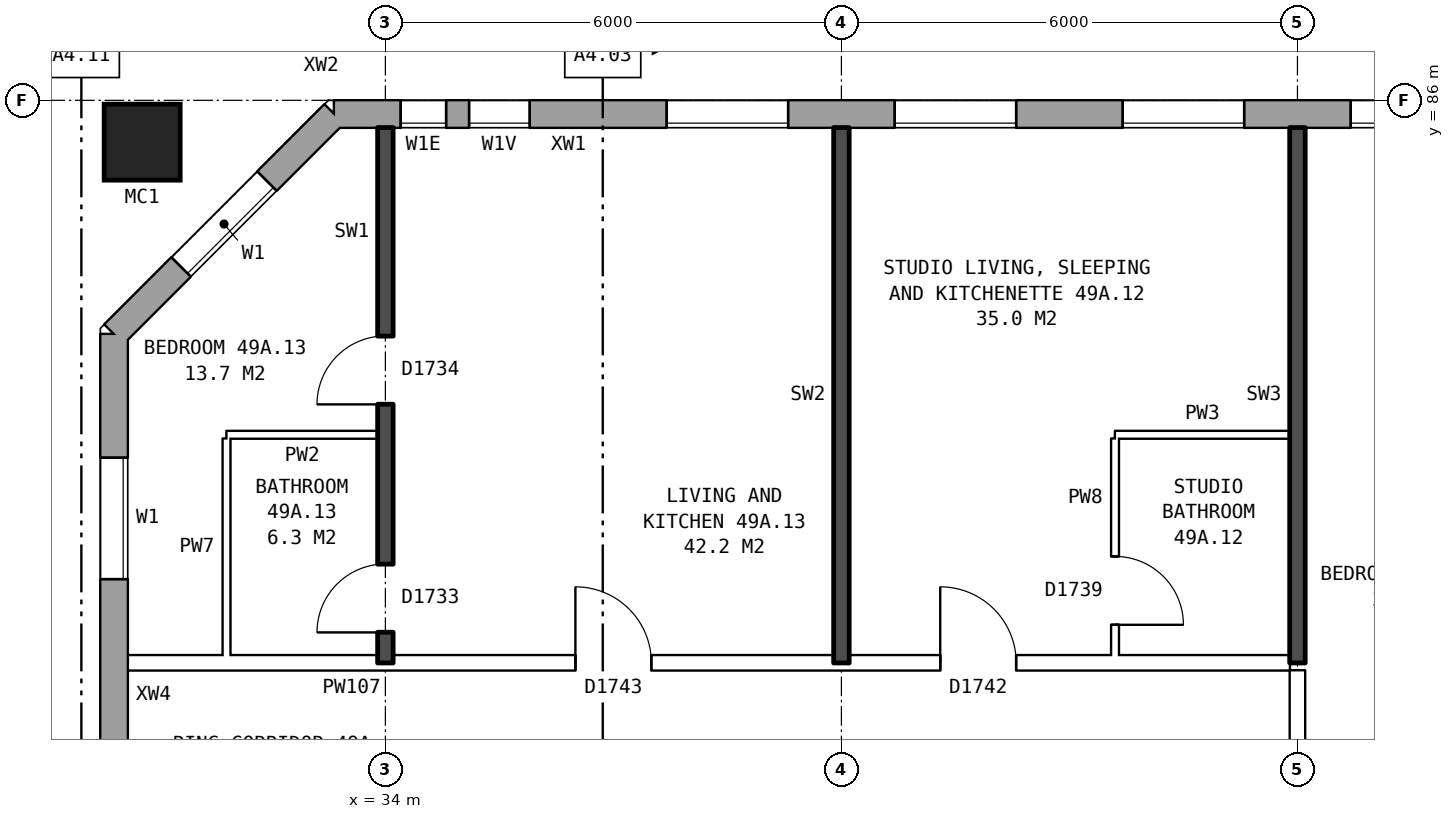
"""IFC4 building model, lengths in metres.
Left out: names, types, materials, properties, quantities, classifications, styles, units other than length and angle.
Written with IfcOpenShell. Run it as: python <this file> out.ifc"""

import sys

from ifc_helpers import new_model, si_unit, direction, frame, frame_2d, origin, origin_2d, place, context, subcontext, project, spatial, rectangle, hollow_rectangle, extrude, element, fill, save


model = new_model("IFC4")
c1 = context("Model", 3, precision=1e-05, world=origin(), true_north=direction((0.0, 1.0)))
c2 = subcontext(c1, "Body", "Model", "MODEL_VIEW")
j1 = project(units=[si_unit("LENGTHUNIT", "METRE"), si_unit("PLANEANGLEUNIT", "RADIAN")], contexts=[c1])
p1 = place(None, origin())
s1 = spatial("IfcSite", under=j1, at=p1, CompositionType="ELEMENT")
p2 = place(p1, origin())
s2 = spatial("IfcBuilding", under=s1, at=p2, CompositionType="ELEMENT")
p3 = place(p2, frame((0.0, 0.0, 175.8)))
s3 = spatial("IfcBuildingStorey", under=s2, at=p3, CompositionType="ELEMENT", Elevation=175.8)
p4 = place(p3, frame((30.8, 85.45, 0.0), z_axis=(0.0, 0.0, 1.0), x_axis=(1.0, 0.0, 0.0)))
e1 = element("IfcColumn", 1, at=p4, inside=s3, PredefinedType="COLUMN", context=c2, shape_type="SweptSolid", body=[
    extrude(hollow_rectangle(XDim=1.0, YDim=1.0, WallThickness=0.055, at=origin_2d()), origin(), (0.0, 0.0, 1.0), 3.1),
])
p5 = place(p3, frame((72.925, 85.82, 0.0), z_axis=(0.0, 0.0, 1.0), x_axis=(-1.0, 0.0, 0.0)))
e2 = element("IfcWall", 2, at=p5, inside=s3, PredefinedType="STANDARD", context=c2, shape_type="SweptSolid", body=[
    extrude(rectangle(XDim=39.601, YDim=0.36, at=frame_2d((19.8, 0.0))), origin(), (0.0, 0.0, 1.0), 2.85),
])
p6 = place(p5, frame((0.3, 0.0, 0.8)))
e3 = element("IfcOpeningElement", 3, at=p6, cuts=e2, PredefinedType="OPENING", context=c2, shape_type="SweptSolid", body=[
    extrude(rectangle(XDim=1.2, YDim=1.8, at=frame_2d((0.6, 0.9))), frame((0.0, 0.19, 0.0), z_axis=(0.0, -1.0, 0.0), x_axis=(1.0, 0.0, 0.0)), (0.0, 0.0, 1.0), 0.38),
])
p7 = place(p5, frame((3.675, 0.0, 0.8)))
e4 = element("IfcOpeningElement", 4, at=p7, cuts=e2, PredefinedType="OPENING", context=c2, shape_type="SweptSolid", body=[
    extrude(rectangle(XDim=0.6, YDim=0.9, at=frame_2d((0.3, 0.45))), frame((0.0, 0.19, 0.0), z_axis=(0.0, -1.0, 0.0), x_axis=(1.0, 0.0, 0.0)), (0.0, 0.0, 1.0), 0.38),
])
p8 = place(p5, frame((6.625, 0.0, 0.8)))
e5 = element("IfcOpeningElement", 5, at=p8, cuts=e2, PredefinedType="OPENING", context=c2, shape_type="SweptSolid", body=[
    extrude(rectangle(XDim=1.6, YDim=1.8, at=frame_2d((0.8, 0.9))), frame((0.0, 0.19, 0.0), z_axis=(0.0, -1.0, 0.0), x_axis=(1.0, 0.0, 0.0)), (0.0, 0.0, 1.0), 0.38),
])
p9 = place(p5, frame((9.625, 0.0, 0.8)))
e6 = element("IfcOpeningElement", 6, at=p9, cuts=e2, PredefinedType="OPENING", context=c2, shape_type="SweptSolid", body=[
    extrude(rectangle(XDim=1.6, YDim=1.8, at=frame_2d((0.8, 0.9))), frame((0.0, 0.19, 0.0), z_axis=(0.0, -1.0, 0.0), x_axis=(1.0, 0.0, 0.0)), (0.0, 0.0, 1.0), 0.38),
])
p10 = place(p5, frame((12.625, 0.0, 0.8)))
e7 = element("IfcOpeningElement", 7, at=p10, cuts=e2, PredefinedType="OPENING", context=c2, shape_type="SweptSolid", body=[
    extrude(rectangle(XDim=1.6, YDim=1.8, at=frame_2d((0.8, 0.9))), frame((0.0, 0.19, 0.0), z_axis=(0.0, -1.0, 0.0), x_axis=(1.0, 0.0, 0.0)), (0.0, 0.0, 1.0), 0.38),
])
p11 = place(p5, frame((15.625, 0.0, 0.8)))
e8 = element("IfcOpeningElement", 8, at=p11, cuts=e2, PredefinedType="OPENING", context=c2, shape_type="SweptSolid", body=[
    extrude(rectangle(XDim=1.6, YDim=1.8, at=frame_2d((0.8, 0.9))), frame((0.0, 0.19, 0.0), z_axis=(0.0, -1.0, 0.0), x_axis=(1.0, 0.0, 0.0)), (0.0, 0.0, 1.0), 0.38),
])
p12 = place(p5, frame((18.625, 0.0, 0.8)))
e9 = element("IfcOpeningElement", 9, at=p12, cuts=e2, PredefinedType="OPENING", context=c2, shape_type="SweptSolid", body=[
    extrude(rectangle(XDim=1.6, YDim=1.8, at=frame_2d((0.8, 0.9))), frame((0.0, 0.19, 0.0), z_axis=(0.0, -1.0, 0.0), x_axis=(1.0, 0.0, 0.0)), (0.0, 0.0, 1.0), 0.38),
])
p13 = place(p5, frame((21.625, 0.0, 0.8)))
e10 = element("IfcOpeningElement", 10, at=p13, cuts=e2, PredefinedType="OPENING", context=c2, shape_type="SweptSolid", body=[
    extrude(rectangle(XDim=1.6, YDim=1.8, at=frame_2d((0.8, 0.9))), frame((0.0, 0.19, 0.0), z_axis=(0.0, -1.0, 0.0), x_axis=(1.0, 0.0, 0.0)), (0.0, 0.0, 1.0), 0.38),
])
p14 = place(p5, frame((24.625, 0.0, 0.8)))
e11 = element("IfcOpeningElement", 11, at=p14, cuts=e2, PredefinedType="OPENING", context=c2, shape_type="SweptSolid", body=[
    extrude(rectangle(XDim=1.6, YDim=1.8, at=frame_2d((0.8, 0.9))), frame((0.0, 0.19, 0.0), z_axis=(0.0, -1.0, 0.0), x_axis=(1.0, 0.0, 0.0)), (0.0, 0.0, 1.0), 0.38),
])
p15 = place(p5, frame((27.625, 0.0, 0.8)))
e12 = element("IfcOpeningElement", 12, at=p15, cuts=e2, PredefinedType="OPENING", context=c2, shape_type="SweptSolid", body=[
    extrude(rectangle(XDim=1.6, YDim=1.8, at=frame_2d((0.8, 0.9))), frame((0.0, 0.19, 0.0), z_axis=(0.0, -1.0, 0.0), x_axis=(1.0, 0.0, 0.0)), (0.0, 0.0, 1.0), 0.38),
])
p16 = place(p5, frame((30.625, 0.0, 0.8)))
e13 = element("IfcOpeningElement", 13, at=p16, cuts=e2, PredefinedType="OPENING", context=c2, shape_type="SweptSolid", body=[
    extrude(rectangle(XDim=1.6, YDim=1.8, at=frame_2d((0.8, 0.9))), frame((0.0, 0.19, 0.0), z_axis=(0.0, -1.0, 0.0), x_axis=(1.0, 0.0, 0.0)), (0.0, 0.0, 1.0), 0.38),
])
p17 = place(p5, frame((33.625, 0.0, 0.8)))
e14 = element("IfcOpeningElement", 14, at=p17, cuts=e2, PredefinedType="OPENING", context=c2, shape_type="SweptSolid", body=[
    extrude(rectangle(XDim=1.6, YDim=1.8, at=frame_2d((0.8, 0.9))), frame((0.0, 0.19, 0.0), z_axis=(0.0, -1.0, 0.0), x_axis=(1.0, 0.0, 0.0)), (0.0, 0.0, 1.0), 0.38),
])
p18 = place(p5, frame((37.025, 0.0, 1.7)))
e15 = element("IfcOpeningElement", 15, at=p18, cuts=e2, PredefinedType="OPENING", context=c2, shape_type="SweptSolid", body=[
    extrude(rectangle(XDim=0.8, YDim=0.9, at=frame_2d((0.4, 0.45))), frame((0.0, 0.19, 0.0), z_axis=(0.0, -1.0, 0.0), x_axis=(1.0, 0.0, 0.0)), (0.0, 0.0, 1.0), 0.38),
])
p19 = place(p5, frame((1.8, 0.0, 1.6)))
e16 = element("IfcOpeningElement", 16, at=p19, cuts=e2, PredefinedType="OPENING", context=c2, shape_type="SweptSolid", body=[
    extrude(rectangle(XDim=0.6, YDim=0.9, at=frame_2d((0.3, 0.45))), frame((0.0, 0.19, 0.0), z_axis=(0.0, -1.0, 0.0), x_axis=(1.0, 0.0, 0.0)), (0.0, 0.0, 1.0), 0.38),
])
p20 = place(p5, frame((4.575, 0.0, 0.8)))
e17 = element("IfcOpeningElement", 17, at=p20, cuts=e2, PredefinedType="OPENING", context=c2, shape_type="SweptSolid", body=[
    extrude(rectangle(XDim=1.6, YDim=1.8, at=frame_2d((0.8, 0.9))), frame((0.0, 0.19, 0.0), z_axis=(0.0, -1.0, 0.0), x_axis=(1.0, 0.0, 0.0)), (0.0, 0.0, 1.0), 0.38),
])
p21 = place(p5, frame((38.125, 0.0, 0.8)))
e18 = element("IfcOpeningElement", 18, at=p21, cuts=e2, PredefinedType="OPENING", context=c2, shape_type="SweptSolid", body=[
    extrude(rectangle(XDim=0.6, YDim=1.8, at=frame_2d((0.3, 0.9))), frame((0.0, 0.19, 0.0), z_axis=(0.0, -1.0, 0.0), x_axis=(1.0, 0.0, 0.0)), (0.0, 0.0, 1.0), 0.38),
])
p22 = place(p3, frame((33.325, 85.82, 0.0), z_axis=(0.0, 0.0, 1.0), x_axis=(-0.707106781187, -0.707106781187, 0.0)))
e19 = element("IfcWall", 19, at=p22, inside=s3, PredefinedType="STANDARD", context=c2, shape_type="SweptSolid", body=[
    extrude(rectangle(XDim=4.094, YDim=0.36, at=frame_2d((2.047, 0.0))), origin(), (0.0, 0.0, 1.0), 2.85),
])
p23 = place(p22, frame((1.247, 0.0, 0.8)))
e20 = element("IfcOpeningElement", 20, at=p23, cuts=e19, PredefinedType="OPENING", context=c2, shape_type="SweptSolid", body=[
    extrude(rectangle(XDim=1.6, YDim=1.8, at=frame_2d((0.8, 0.9))), frame((0.0, 0.19, 0.0), z_axis=(0.0, -1.0, 0.0), x_axis=(1.0, 0.0, 0.0)), (0.0, 0.0, 1.0), 0.38),
])
p24 = place(p3, frame((30.43, 82.925, 0.0), z_axis=(0.0, 0.0, 1.0), x_axis=(0.0, -1.0, 0.0)))
e21 = element("IfcWall", 21, at=p24, inside=s3, PredefinedType="STANDARD", context=c2, shape_type="SweptSolid", body=[
    extrude(rectangle(XDim=25.851, YDim=0.36, at=frame_2d((12.925, 0.0))), origin(), (0.0, 0.0, 1.0), 2.85),
])
p25 = place(p24, frame((1.625, 0.0, 0.8)))
e22 = element("IfcOpeningElement", 22, at=p25, cuts=e21, PredefinedType="OPENING", context=c2, shape_type="SweptSolid", body=[
    extrude(rectangle(XDim=1.6, YDim=1.8, at=frame_2d((0.8, 0.9))), frame((0.0, 0.19, 0.0), z_axis=(0.0, -1.0, 0.0), x_axis=(1.0, 0.0, 0.0)), (0.0, 0.0, 1.0), 0.38),
])
p26 = place(p24, frame((5.725, 0.0, 0.8)))
e23 = element("IfcOpeningElement", 23, at=p26, cuts=e21, PredefinedType="OPENING", context=c2, shape_type="SweptSolid", body=[
    extrude(rectangle(XDim=1.6, YDim=0.9, at=frame_2d((0.8, 0.45))), frame((0.0, 0.19, 0.0), z_axis=(0.0, -1.0, 0.0), x_axis=(1.0, 0.0, 0.0)), (0.0, 0.0, 1.0), 0.38),
])
p27 = place(p24, frame((7.625, 0.0, 0.8)))
e24 = element("IfcOpeningElement", 24, at=p27, cuts=e21, PredefinedType="OPENING", context=c2, shape_type="SweptSolid", body=[
    extrude(rectangle(XDim=1.6, YDim=1.8, at=frame_2d((0.8, 0.9))), frame((0.0, 0.19, 0.0), z_axis=(0.0, -1.0, 0.0), x_axis=(1.0, 0.0, 0.0)), (0.0, 0.0, 1.0), 0.38),
])
p28 = place(p24, frame((10.625, 0.0, 0.8)))
e25 = element("IfcOpeningElement", 25, at=p28, cuts=e21, PredefinedType="OPENING", context=c2, shape_type="SweptSolid", body=[
    extrude(rectangle(XDim=1.6, YDim=1.8, at=frame_2d((0.8, 0.9))), frame((0.0, 0.19, 0.0), z_axis=(0.0, -1.0, 0.0), x_axis=(1.0, 0.0, 0.0)), (0.0, 0.0, 1.0), 0.38),
])
p29 = place(p24, frame((13.625, 0.0, 0.8)))
e26 = element("IfcOpeningElement", 26, at=p29, cuts=e21, PredefinedType="OPENING", context=c2, shape_type="SweptSolid", body=[
    extrude(rectangle(XDim=1.6, YDim=1.8, at=frame_2d((0.8, 0.9))), frame((0.0, 0.19, 0.0), z_axis=(0.0, -1.0, 0.0), x_axis=(1.0, 0.0, 0.0)), (0.0, 0.0, 1.0), 0.38),
])
p30 = place(p24, frame((16.625, 0.0, 0.8)))
e27 = element("IfcOpeningElement", 27, at=p30, cuts=e21, PredefinedType="OPENING", context=c2, shape_type="SweptSolid", body=[
    extrude(rectangle(XDim=1.6, YDim=1.8, at=frame_2d((0.8, 0.9))), frame((0.0, 0.19, 0.0), z_axis=(0.0, -1.0, 0.0), x_axis=(1.0, 0.0, 0.0)), (0.0, 0.0, 1.0), 0.38),
])
p31 = place(p24, frame((9.525, 0.0, 0.8)))
e28 = element("IfcOpeningElement", 28, at=p31, cuts=e21, PredefinedType="OPENING", context=c2, shape_type="SweptSolid", body=[
    extrude(rectangle(XDim=0.8, YDim=1.8, at=frame_2d((0.4, 0.9))), frame((0.0, 0.19, 0.0), z_axis=(0.0, -1.0, 0.0), x_axis=(1.0, 0.0, 0.0)), (0.0, 0.0, 1.0), 0.38),
])
p32 = place(p24, frame((22.625, 0.0, 0.8)))
e29 = element("IfcOpeningElement", 29, at=p32, cuts=e21, PredefinedType="OPENING", context=c2, shape_type="SweptSolid", body=[
    extrude(rectangle(XDim=1.6, YDim=1.8, at=frame_2d((0.8, 0.9))), frame((0.0, 0.19, 0.0), z_axis=(0.0, -1.0, 0.0), x_axis=(1.0, 0.0, 0.0)), (0.0, 0.0, 1.0), 0.38),
])
p33 = place(p24, frame((12.525, 0.0, 0.8)))
e30 = element("IfcOpeningElement", 30, at=p33, cuts=e21, PredefinedType="OPENING", context=c2, shape_type="SweptSolid", body=[
    extrude(rectangle(XDim=0.8, YDim=1.8, at=frame_2d((0.4, 0.9))), frame((0.0, 0.19, 0.0), z_axis=(0.0, -1.0, 0.0), x_axis=(1.0, 0.0, 0.0)), (0.0, 0.0, 1.0), 0.38),
])
p34 = place(p24, frame((15.525, 0.0, 0.8)))
e31 = element("IfcOpeningElement", 31, at=p34, cuts=e21, PredefinedType="OPENING", context=c2, shape_type="SweptSolid", body=[
    extrude(rectangle(XDim=0.8, YDim=1.8, at=frame_2d((0.4, 0.9))), frame((0.0, 0.19, 0.0), z_axis=(0.0, -1.0, 0.0), x_axis=(1.0, 0.0, 0.0)), (0.0, 0.0, 1.0), 0.38),
])
p35 = place(p24, frame((18.525, 0.0, 0.8)))
e32 = element("IfcOpeningElement", 32, at=p35, cuts=e21, PredefinedType="OPENING", context=c2, shape_type="SweptSolid", body=[
    extrude(rectangle(XDim=1.6, YDim=0.9, at=frame_2d((0.8, 0.45))), frame((0.0, 0.19, 0.0), z_axis=(0.0, -1.0, 0.0), x_axis=(1.0, 0.0, 0.0)), (0.0, 0.0, 1.0), 0.38),
])
p36 = place(p3, frame((30.61, 78.6, 0.0), z_axis=(0.0, 0.0, 1.0), x_axis=(1.0, 0.0, 0.0)))
e33 = element("IfcWall", 33, at=p36, inside=s3, PredefinedType="PARTITIONING", context=c2, shape_type="SweptSolid", body=[
    extrude(rectangle(XDim=15.29, YDim=0.2, at=frame_2d((7.645, 0.0))), origin(), (0.0, 0.0, 1.0), 2.85),
])
p37 = place(p36, frame((10.69, 0.0, 0.0)))
e34 = element("IfcOpeningElement", 34, at=p37, cuts=e33, PredefinedType="OPENING", context=c2, shape_type="SweptSolid", body=[
    extrude(rectangle(XDim=1.0, YDim=2.1, at=frame_2d((0.5, 1.05))), frame((0.0, 0.11, 0.0), z_axis=(0.0, -1.0, 0.0), x_axis=(1.0, 0.0, 0.0)), (0.0, 0.0, 1.0), 0.22),
])
p38 = place(p36, frame((5.89, 0.0, 0.0)))
e35 = element("IfcOpeningElement", 35, at=p38, cuts=e33, PredefinedType="OPENING", context=c2, shape_type="SweptSolid", body=[
    extrude(rectangle(XDim=1.0, YDim=2.1, at=frame_2d((0.5, 1.05))), frame((0.0, 0.11, 0.0), z_axis=(0.0, -1.0, 0.0), x_axis=(1.0, 0.0, 0.0)), (0.0, 0.0, 1.0), 0.22),
])
p39 = place(p3, frame((31.91, 81.6, 0.0), z_axis=(0.0, 0.0, 1.0), x_axis=(1.0, 0.0, 0.0)))
e36 = element("IfcWall", 36, at=p39, inside=s3, PredefinedType="PARTITIONING", context=c2, shape_type="SweptSolid", body=[
    extrude(rectangle(XDim=1.99, YDim=0.1, at=frame_2d((0.995, 0.0))), origin(), (0.0, 0.0, 1.0), 2.85),
])
p40 = place(p3, frame((43.6, 81.6, 0.0), z_axis=(0.0, 0.0, 1.0), x_axis=(1.0, 0.0, 0.0)))
e37 = element("IfcWall", 37, at=p40, inside=s3, PredefinedType="PARTITIONING", context=c2, shape_type="SweptSolid", body=[
    extrude(rectangle(XDim=2.3, YDim=0.1, at=frame_2d((1.15, 0.0))), origin(), (0.0, 0.0, 1.0), 2.85),
])
p41 = place(p3, frame((31.91, 78.7, 0.0), z_axis=(0.0, 0.0, 1.0), x_axis=(0.0, 1.0, 0.0)))
e38 = element("IfcWall", 38, at=p41, inside=s3, PredefinedType="PARTITIONING", context=c2, shape_type="SweptSolid", body=[
    extrude(rectangle(XDim=2.85, YDim=0.1, at=frame_2d((1.425, 0.0))), origin(), (0.0, 0.0, 1.0), 2.85),
])
p42 = place(p3, frame((34.0, 78.6, 0.0), z_axis=(0.0, 0.0, 1.0), x_axis=(0.0, 1.0, 0.0)))
e39 = element("IfcWall", 39, at=p42, inside=s3, PredefinedType="SOLIDWALL", context=c2, shape_type="SweptSolid", body=[
    extrude(rectangle(XDim=7.04, YDim=0.2, at=frame_2d((3.52, 0.0))), origin(), (0.0, 0.0, 1.0), 2.85),
])
p43 = place(p42, frame((3.4, 0.0, 0.0)))
e40 = element("IfcOpeningElement", 40, at=p43, cuts=e39, PredefinedType="OPENING", context=c2, shape_type="SweptSolid", body=[
    extrude(rectangle(XDim=0.9, YDim=2.1, at=frame_2d((0.45, 1.05))), frame((0.0, 0.11, 0.0), z_axis=(0.0, -1.0, 0.0), x_axis=(1.0, 0.0, 0.0)), (0.0, 0.0, 1.0), 0.22),
])
p44 = place(p42, frame((0.4, 0.0, 0.0)))
e41 = element("IfcOpeningElement", 41, at=p44, cuts=e39, PredefinedType="OPENING", context=c2, shape_type="SweptSolid", body=[
    extrude(rectangle(XDim=0.9, YDim=2.1, at=frame_2d((0.45, 1.05))), frame((0.0, 0.11, 0.0), z_axis=(0.0, -1.0, 0.0), x_axis=(1.0, 0.0, 0.0)), (0.0, 0.0, 1.0), 0.22),
])
p45 = place(p3, frame((40.0, 78.6, 0.0), z_axis=(0.0, 0.0, 1.0), x_axis=(0.0, 1.0, 0.0)))
e42 = element("IfcWall", 42, at=p45, inside=s3, PredefinedType="SOLIDWALL", context=c2, shape_type="SweptSolid", body=[
    extrude(rectangle(XDim=7.04, YDim=0.2, at=frame_2d((3.52, 0.0))), origin(), (0.0, 0.0, 1.0), 2.85),
])
p46 = place(p3, frame((43.6, 78.7, 0.0), z_axis=(0.0, 0.0, 1.0), x_axis=(0.0, 1.0, 0.0)))
e43 = element("IfcWall", 43, at=p46, inside=s3, PredefinedType="PARTITIONING", context=c2, shape_type="SweptSolid", body=[
    extrude(rectangle(XDim=2.85, YDim=0.1, at=frame_2d((1.425, 0.0))), origin(), (0.0, 0.0, 1.0), 2.85),
])
p47 = place(p46, frame((0.4, 0.0, 0.0)))
e44 = element("IfcOpeningElement", 44, at=p47, cuts=e43, PredefinedType="OPENING", context=c2, shape_type="SweptSolid", body=[
    extrude(rectangle(XDim=0.9, YDim=2.1, at=frame_2d((0.45, 1.05))), frame((0.0, 0.06, 0.0), z_axis=(0.0, -1.0, 0.0), x_axis=(1.0, 0.0, 0.0)), (0.0, 0.0, 1.0), 0.12),
])
p48 = place(p3, frame((46.0, 76.3, 0.0), z_axis=(0.0, 0.0, 1.0), x_axis=(0.0, 1.0, 0.0)))
e45 = element("IfcWall", 45, at=p48, inside=s3, PredefinedType="PARTITIONING", context=c2, shape_type="SweptSolid", body=[
    extrude(rectangle(XDim=2.2, YDim=0.2, at=frame_2d((1.1, 0.0))), origin(), (0.0, 0.0, 1.0), 2.85),
])
p49 = place(p3, frame((46.0, 78.6, 0.0), z_axis=(0.0, 0.0, 1.0), x_axis=(0.0, 1.0, 0.0)))
e46 = element("IfcWall", 46, at=p49, inside=s3, PredefinedType="SOLIDWALL", context=c2, shape_type="SweptSolid", body=[
    extrude(rectangle(XDim=7.04, YDim=0.2, at=frame_2d((3.52, 0.0))), origin(), (0.0, 0.0, 1.0), 2.85),
])
p50 = place(p14, origin())
e47 = element("IfcWindow", 47, at=p50, inside=s3, PartitioningType="SINGLE_PANEL", PredefinedType="WINDOW", context=c2, shape_type="SweptSolid", body=[
    extrude(rectangle(XDim=1.6, YDim=1.8, at=frame_2d((0.8, 0.9))), frame((0.0, 0.15, 0.0), z_axis=(0.0, -1.0, 0.0), x_axis=(1.0, 0.0, 0.0)), (0.0, 0.0, 1.0), 0.06),
])
fill(e11, e47)
p51 = place(p15, origin())
e48 = element("IfcWindow", 48, at=p51, inside=s3, PartitioningType="SINGLE_PANEL", PredefinedType="WINDOW", context=c2, shape_type="SweptSolid", body=[
    extrude(rectangle(XDim=1.6, YDim=1.8, at=frame_2d((0.8, 0.9))), frame((0.0, 0.15, 0.0), z_axis=(0.0, -1.0, 0.0), x_axis=(1.0, 0.0, 0.0)), (0.0, 0.0, 1.0), 0.06),
])
fill(e12, e48)
p52 = place(p16, origin())
e49 = element("IfcWindow", 49, at=p52, inside=s3, PartitioningType="SINGLE_PANEL", PredefinedType="WINDOW", context=c2, shape_type="SweptSolid", body=[
    extrude(rectangle(XDim=1.6, YDim=1.8, at=frame_2d((0.8, 0.9))), frame((0.0, 0.15, 0.0), z_axis=(0.0, -1.0, 0.0), x_axis=(1.0, 0.0, 0.0)), (0.0, 0.0, 1.0), 0.06),
])
fill(e13, e49)
p53 = place(p17, origin())
e50 = element("IfcWindow", 50, at=p53, inside=s3, PartitioningType="SINGLE_PANEL", PredefinedType="WINDOW", context=c2, shape_type="SweptSolid", body=[
    extrude(rectangle(XDim=1.6, YDim=1.8, at=frame_2d((0.8, 0.9))), frame((0.0, 0.15, 0.0), z_axis=(0.0, -1.0, 0.0), x_axis=(1.0, 0.0, 0.0)), (0.0, 0.0, 1.0), 0.06),
])
fill(e14, e50)
p54 = place(p18, origin())
e51 = element("IfcWindow", 51, at=p54, inside=s3, PartitioningType="SINGLE_PANEL", PredefinedType="WINDOW", context=c2, shape_type="SweptSolid", body=[
    extrude(rectangle(XDim=0.8, YDim=0.9, at=frame_2d((0.4, 0.45))), frame((0.0, 0.15, 0.0), z_axis=(0.0, -1.0, 0.0), x_axis=(1.0, 0.0, 0.0)), (0.0, 0.0, 1.0), 0.06),
])
fill(e15, e51)
p55 = place(p23, origin())
e52 = element("IfcWindow", 52, at=p55, inside=s3, PartitioningType="SINGLE_PANEL", PredefinedType="WINDOW", context=c2, shape_type="SweptSolid", body=[
    extrude(rectangle(XDim=1.6, YDim=1.8, at=frame_2d((0.8, 0.9))), frame((0.0, 0.15, 0.0), z_axis=(0.0, -1.0, 0.0), x_axis=(1.0, 0.0, 0.0)), (0.0, 0.0, 1.0), 0.06),
])
fill(e20, e52)
p56 = place(p25, origin())
e53 = element("IfcWindow", 53, at=p56, inside=s3, PartitioningType="SINGLE_PANEL", PredefinedType="WINDOW", context=c2, shape_type="SweptSolid", body=[
    extrude(rectangle(XDim=1.6, YDim=1.8, at=frame_2d((0.8, 0.9))), frame((0.0, 0.15, 0.0), z_axis=(0.0, -1.0, 0.0), x_axis=(1.0, 0.0, 0.0)), (0.0, 0.0, 1.0), 0.06),
])
fill(e22, e53)
p57 = place(p37, origin())
e54 = element("IfcDoor", 54, at=p57, inside=s3, OperationType="SINGLE_SWING_LEFT", PredefinedType="DOOR", context=c2, shape_type="SweptSolid", body=[
    extrude(rectangle(XDim=1.0, YDim=2.1, at=frame_2d((0.5, 1.05))), frame((0.0, 0.025, 0.0), z_axis=(0.0, -1.0, 0.0), x_axis=(1.0, 0.0, 0.0)), (0.0, 0.0, 1.0), 0.05),
])
fill(e34, e54)
p58 = place(p47, frame((0.9, 0.0, 0.0), z_axis=(0.0, 0.0, 1.0), x_axis=(-1.0, 0.0, 0.0)))
e55 = element("IfcDoor", 55, at=p58, inside=s3, OperationType="SINGLE_SWING_RIGHT", PredefinedType="DOOR", context=c2, shape_type="SweptSolid", body=[
    extrude(rectangle(XDim=0.9, YDim=2.1, at=frame_2d((0.45, 1.05))), frame((0.0, 0.025, 0.0), z_axis=(0.0, -1.0, 0.0), x_axis=(1.0, 0.0, 0.0)), (0.0, 0.0, 1.0), 0.05),
])
fill(e44, e55)
p59 = place(p43, origin())
e56 = element("IfcDoor", 56, at=p59, inside=s3, OperationType="SINGLE_SWING_LEFT", PredefinedType="DOOR", context=c2, shape_type="SweptSolid", body=[
    extrude(rectangle(XDim=0.9, YDim=2.1, at=frame_2d((0.45, 1.05))), frame((0.0, 0.025, 0.0), z_axis=(0.0, -1.0, 0.0), x_axis=(1.0, 0.0, 0.0)), (0.0, 0.0, 1.0), 0.05),
])
fill(e40, e56)
p60 = place(p38, origin())
e57 = element("IfcDoor", 57, at=p60, inside=s3, OperationType="SINGLE_SWING_LEFT", PredefinedType="DOOR", context=c2, shape_type="SweptSolid", body=[
    extrude(rectangle(XDim=1.0, YDim=2.1, at=frame_2d((0.5, 1.05))), frame((0.0, 0.025, 0.0), z_axis=(0.0, -1.0, 0.0), x_axis=(1.0, 0.0, 0.0)), (0.0, 0.0, 1.0), 0.05),
])
fill(e35, e57)
p61 = place(p44, origin())
e58 = element("IfcDoor", 58, at=p61, inside=s3, OperationType="SINGLE_SWING_LEFT", PredefinedType="DOOR", context=c2, shape_type="SweptSolid", body=[
    extrude(rectangle(XDim=0.9, YDim=2.1, at=frame_2d((0.45, 1.05))), frame((0.0, 0.025, 0.0), z_axis=(0.0, -1.0, 0.0), x_axis=(1.0, 0.0, 0.0)), (0.0, 0.0, 1.0), 0.05),
])
fill(e41, e58)
p62 = place(p21, origin())
e59 = element("IfcWindow", 59, at=p62, inside=s3, PartitioningType="SINGLE_PANEL", PredefinedType="WINDOW", context=c2, shape_type="SweptSolid", body=[
    extrude(rectangle(XDim=0.6, YDim=1.8, at=frame_2d((0.3, 0.9))), frame((0.0, 0.15, 0.0), z_axis=(0.0, -1.0, 0.0), x_axis=(1.0, 0.0, 0.0)), (0.0, 0.0, 1.0), 0.06),
])
fill(e18, e59)
save(model, sys.argv[1])
